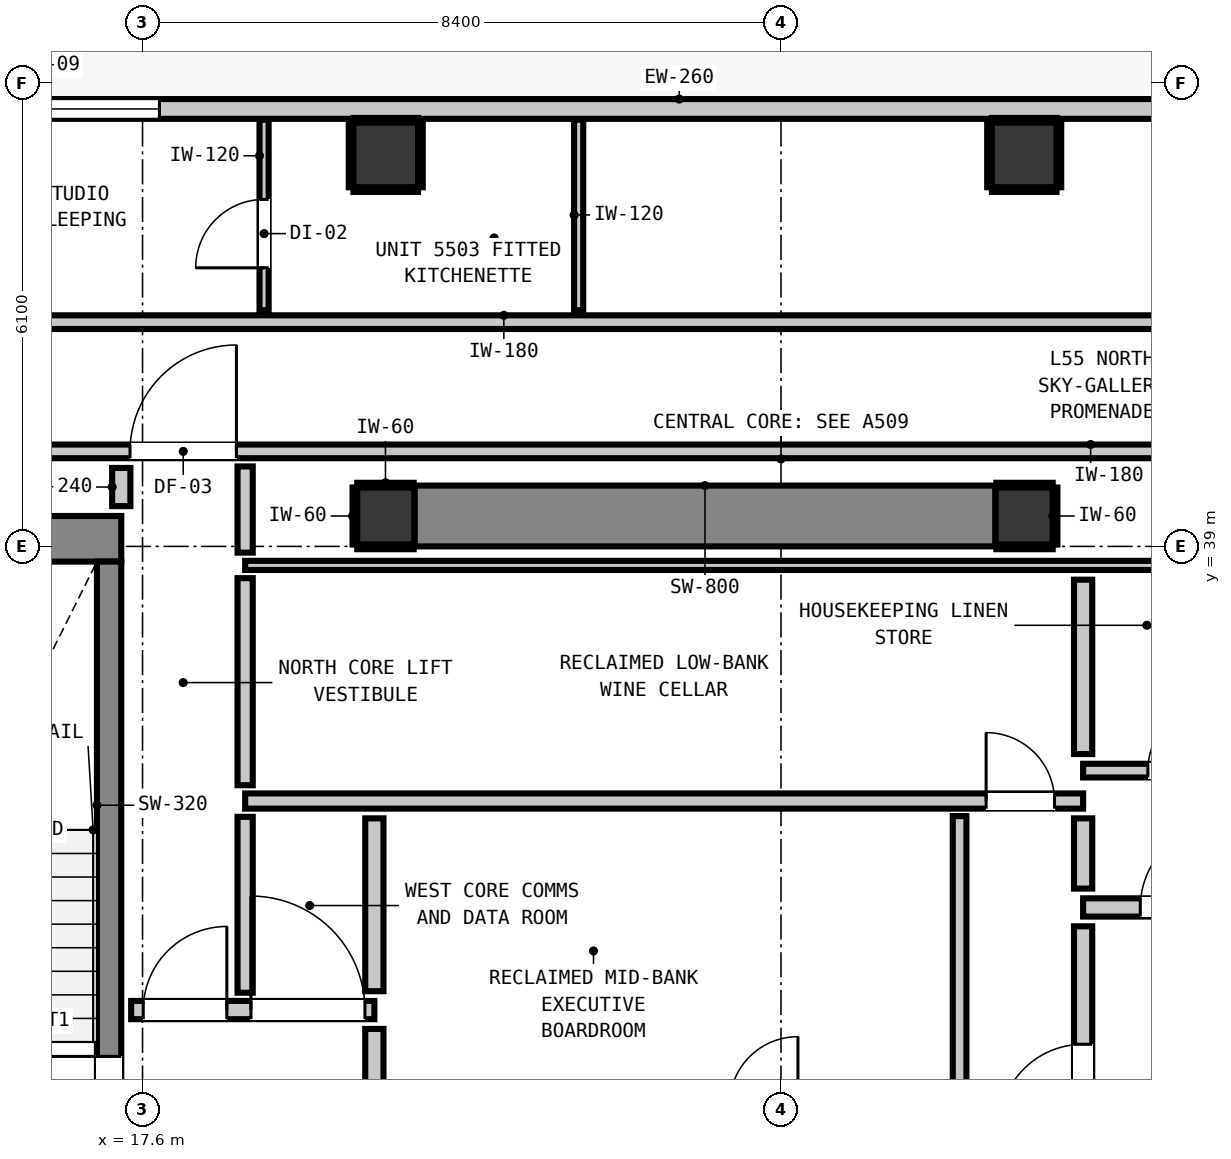
"""IFC4 building model, lengths in metres.
Left out: names, types, materials, properties, quantities, classifications, styles, units other than length and angle.
Written with IfcOpenShell. Run it as: python <this file> out.ifc"""

import sys

from ifc_helpers import new_model, si_unit, direction, frame, frame_2d, origin, origin_2d, place, context, subcontext, project, spatial, rectangle, extrude, element, fill, save


model = new_model("IFC4")
c1 = context("Model", 3, precision=1e-05, world=origin(), true_north=direction((0.0, 1.0)))
c2 = subcontext(c1, "Body", "Model", "MODEL_VIEW")
j1 = project(units=[si_unit("LENGTHUNIT", "METRE"), si_unit("PLANEANGLEUNIT", "RADIAN")], contexts=[c1])
p1 = place(None, origin())
s1 = spatial("IfcSite", under=j1, at=p1, CompositionType="ELEMENT")
p2 = place(p1, origin())
s2 = spatial("IfcBuilding", under=s1, at=p2, CompositionType="ELEMENT")
p3 = place(p2, frame((0.0, 0.0, 190.16)))
s3 = spatial("IfcBuildingStorey", under=s2, at=p3, CompositionType="ELEMENT", Elevation=190.16)
for number, where, z_axis, x_axis in (
    (1, (20.8, 39.4, 0.0), (0.0, 0.0, 1.0), (1.0, 0.0, 0.0)),
    (2, (29.2, 39.4, 0.0), (0.0, 0.0, 1.0), (1.0, 0.0, 0.0)),
):
    element("IfcColumn", number, at=place(p3, frame(where, z_axis=z_axis, x_axis=x_axis)), inside=s3, PredefinedType="COLUMN", context=c2, shape_type="SweptSolid", body=[
        extrude(rectangle(XDim=0.75, YDim=0.75, at=origin_2d()), origin(), (0.0, 0.0, 1.0), 3.32),
    ])
p4 = place(p3, frame((13.24, 39.1, 0.0), z_axis=(0.0, 0.0, 1.0), x_axis=(1.0, 0.0, 0.0)))
e3 = element("IfcWall", 3, at=p4, inside=s3, PredefinedType="SHEAR", context=c2, shape_type="SweptSolid", body=[
    extrude(rectangle(XDim=4.08, YDim=0.6, at=frame_2d((2.04, 0.0))), origin(), (0.0, 0.0, 1.0), 3.32),
])
p5 = place(p3, frame((21.18, 39.4, 0.0), z_axis=(0.0, 0.0, 1.0), x_axis=(1.0, 0.0, 0.0)))
e4 = element("IfcWall", 4, at=p5, inside=s3, PredefinedType="SHEAR", context=c2, shape_type="SweptSolid", body=[
    extrude(rectangle(XDim=7.64, YDim=0.8, at=frame_2d((3.82, 0.0))), origin(), (0.0, 0.0, 1.0), 3.32),
])
p6 = place(p3, frame((17.16, 31.0, 0.0), z_axis=(0.0, 0.0, 1.0), x_axis=(0.0, 1.0, 0.0)))
e5 = element("IfcWall", 5, at=p6, inside=s3, PredefinedType="SHEAR", context=c2, shape_type="SweptSolid", body=[
    extrude(rectangle(XDim=7.8, YDim=0.32, at=frame_2d((3.9, 0.0))), origin(), (0.0, 0.0, 1.0), 3.32),
])
p7 = place(p6, frame((0.19, 0.0, 0.0)))
e6 = element("IfcOpeningElement", 6, at=p7, cuts=e5, PredefinedType="OPENING", context=c2, shape_type="SweptSolid", body=[
    extrude(rectangle(XDim=1.1, YDim=2.15, at=frame_2d((0.55, 1.075))), frame((0.0, 0.17, 0.0), z_axis=(0.0, -1.0, 0.0), x_axis=(1.0, 0.0, 0.0)), (0.0, 0.0, 1.0), 0.34),
])
for number, where, z_axis, x_axis in (
    (7, (20.8, 44.15, -0.2), (0.0, 0.0, 1.0), (1.0, 0.0, 0.0)),
    (8, (29.2, 44.15, -0.2), (0.0, 0.0, 1.0), (1.0, 0.0, 0.0)),
):
    element("IfcColumn", number, at=place(p3, frame(where, z_axis=z_axis, x_axis=x_axis)), inside=s3, PredefinedType="COLUMN", context=c2, shape_type="SweptSolid", body=[
        extrude(rectangle(XDim=0.85, YDim=0.85, at=origin_2d()), origin(), (0.0, 0.0, 1.0), 3.52),
    ])
p8 = place(p3, frame((6.545, 44.755, 0.0), z_axis=(0.0, 0.0, 1.0), x_axis=(1.0, 0.0, 0.0)))
e9 = element("IfcWall", 9, at=p8, inside=s3, PredefinedType="STANDARD", context=c2, shape_type="SweptSolid", body=[
    extrude(rectangle(XDim=32.71, YDim=0.26, at=frame_2d((16.355, 0.0))), origin(), (0.0, 0.0, 1.0), 3.1),
])
p9 = place(p8, frame((0.857, 0.0, 0.0)))
e10 = element("IfcOpeningElement", 10, at=p9, cuts=e9, PredefinedType="OPENING", context=c2, shape_type="SweptSolid", body=[
    extrude(rectangle(XDim=1.1, YDim=2.15, at=frame_2d((0.55, 1.075))), frame((0.0, 0.14, 0.0), z_axis=(0.0, -1.0, 0.0), x_axis=(1.0, 0.0, 0.0)), (0.0, 0.0, 1.0), 0.28),
])
p10 = place(p8, frame((8.577, 0.0, 0.85)))
e11 = element("IfcOpeningElement", 11, at=p10, cuts=e9, PredefinedType="OPENING", context=c2, shape_type="SweptSolid", body=[
    extrude(rectangle(XDim=2.7, YDim=2.0, at=frame_2d((1.35, 1.0))), frame((0.0, 0.14, 0.0), z_axis=(0.0, -1.0, 0.0), x_axis=(1.0, 0.0, 0.0)), (0.0, 0.0, 1.0), 0.28),
])
p11 = place(p8, frame((24.955, 0.0, 0.85)))
e12 = element("IfcOpeningElement", 12, at=p11, cuts=e9, PredefinedType="OPENING", context=c2, shape_type="SweptSolid", body=[
    extrude(rectangle(XDim=2.7, YDim=2.0, at=frame_2d((1.35, 1.0))), frame((0.0, 0.14, 0.0), z_axis=(0.0, -1.0, 0.0), x_axis=(1.0, 0.0, 0.0)), (0.0, 0.0, 1.0), 0.28),
])
p12 = place(p3, frame((17.45, 32.9, 0.0), z_axis=(0.0, 0.0, 1.0), x_axis=(1.0, 0.0, 0.0)))
e13 = element("IfcWall", 13, at=p12, inside=s3, PredefinedType="PARTITIONING", context=c2, shape_type="SweptSolid", body=[
    extrude(rectangle(XDim=3.2, YDim=0.24, at=frame_2d((1.6, 0.0))), origin(), (0.0, 0.0, 1.0), 3.1),
])
p13 = place(p12, frame((0.159, 0.0, 0.0)))
e14 = element("IfcOpeningElement", 14, at=p13, cuts=e13, PredefinedType="OPENING", context=c2, shape_type="SweptSolid", body=[
    extrude(rectangle(XDim=1.1, YDim=2.15, at=frame_2d((0.55, 1.075))), frame((0.0, 0.13, 0.0), z_axis=(0.0, -1.0, 0.0), x_axis=(1.0, 0.0, 0.0)), (0.0, 0.0, 1.0), 0.26),
])
p14 = place(p12, frame((1.576, 0.0, 0.0)))
e15 = element("IfcOpeningElement", 15, at=p14, cuts=e13, PredefinedType="OPENING", context=c2, shape_type="SweptSolid", body=[
    extrude(rectangle(XDim=1.5, YDim=2.15, at=frame_2d((0.75, 1.075))), frame((0.0, 0.13, 0.0), z_axis=(0.0, -1.0, 0.0), x_axis=(1.0, 0.0, 0.0)), (0.0, 0.0, 1.0), 0.26),
])
p15 = place(p3, frame((29.975, 34.25, 0.0), z_axis=(0.0, 0.0, 1.0), x_axis=(1.0, 0.0, 0.0)))
e16 = element("IfcWall", 16, at=p15, inside=s3, PredefinedType="PARTITIONING", context=c2, shape_type="SweptSolid", body=[
    extrude(rectangle(XDim=2.475, YDim=0.24, at=frame_2d((1.237, 0.0))), origin(), (0.0, 0.0, 1.0), 3.1),
])
p16 = place(p15, frame((0.752, 0.0, 0.0)))
e17 = element("IfcOpeningElement", 17, at=p16, cuts=e16, PredefinedType="OPENING", context=c2, shape_type="SweptSolid", body=[
    extrude(rectangle(XDim=1.1, YDim=2.15, at=frame_2d((0.55, 1.075))), frame((0.0, 0.13, 0.0), z_axis=(0.0, -1.0, 0.0), x_axis=(1.0, 0.0, 0.0)), (0.0, 0.0, 1.0), 0.26),
])
p17 = place(p3, frame((18.95, 35.65, 0.0), z_axis=(0.0, 0.0, 1.0), x_axis=(1.0, 0.0, 0.0)))
e18 = element("IfcWall", 18, at=p17, inside=s3, PredefinedType="PARTITIONING", context=c2, shape_type="SweptSolid", body=[
    extrude(rectangle(XDim=11.025, YDim=0.2, at=frame_2d((5.513, 0.0))), origin(), (0.0, 0.0, 1.0), 3.1),
])
p18 = place(p17, frame((9.749, 0.0, 0.0)))
e19 = element("IfcOpeningElement", 19, at=p18, cuts=e18, PredefinedType="OPENING", context=c2, shape_type="SweptSolid", body=[
    extrude(rectangle(XDim=0.9, YDim=2.1, at=frame_2d((0.45, 1.05))), frame((0.0, 0.11, 0.0), z_axis=(0.0, -1.0, 0.0), x_axis=(1.0, 0.0, 0.0)), (0.0, 0.0, 1.0), 0.22),
])
p19 = place(p3, frame((29.975, 36.05, 0.0), z_axis=(0.0, 0.0, 1.0), x_axis=(1.0, 0.0, 0.0)))
e20 = element("IfcWall", 20, at=p19, inside=s3, PredefinedType="PARTITIONING", context=c2, shape_type="SweptSolid", body=[
    extrude(rectangle(XDim=2.505, YDim=0.18, at=frame_2d((1.252, 0.0))), origin(), (0.0, 0.0, 1.0), 3.1),
])
p20 = place(p19, frame((0.852, 0.0, 0.0)))
e21 = element("IfcOpeningElement", 21, at=p20, cuts=e20, PredefinedType="OPENING", context=c2, shape_type="SweptSolid", body=[
    extrude(rectangle(XDim=0.9, YDim=2.1, at=frame_2d((0.45, 1.05))), frame((0.0, 0.1, 0.0), z_axis=(0.0, -1.0, 0.0), x_axis=(1.0, 0.0, 0.0)), (0.0, 0.0, 1.0), 0.2),
])
p21 = place(p3, frame((13.012, 40.25, 0.0), z_axis=(0.0, 0.0, 1.0), x_axis=(1.0, 0.0, 0.0)))
e22 = element("IfcWall", 22, at=p21, inside=s3, PredefinedType="PARTITIONING", context=c2, shape_type="SweptSolid", body=[
    extrude(rectangle(XDim=28.201, YDim=0.18, at=frame_2d((14.101, 0.0))), origin(), (0.0, 0.0, 1.0), 3.1),
])
p22 = place(p21, frame((4.423, 0.0, 0.0)))
e23 = element("IfcOpeningElement", 23, at=p22, cuts=e22, PredefinedType="OPENING", context=c2, shape_type="SweptSolid", body=[
    extrude(rectangle(XDim=1.4, YDim=2.15, at=frame_2d((0.7, 1.075))), frame((0.0, 0.1, 0.0), z_axis=(0.0, -1.0, 0.0), x_axis=(1.0, 0.0, 0.0)), (0.0, 0.0, 1.0), 0.2),
])
p23 = place(p3, frame((13.012, 41.95, 0.0), z_axis=(0.0, 0.0, 1.0), x_axis=(1.0, 0.0, 0.0)))
e24 = element("IfcWall", 24, at=p23, inside=s3, PredefinedType="PARTITIONING", context=c2, shape_type="SweptSolid", body=[
    extrude(rectangle(XDim=28.201, YDim=0.18, at=frame_2d((14.101, 0.0))), origin(), (0.0, 0.0, 1.0), 3.1),
])
p24 = place(p23, frame((18.783, 0.0, 0.0)))
e25 = element("IfcOpeningElement", 25, at=p24, cuts=e24, PredefinedType="OPENING", context=c2, shape_type="SweptSolid", body=[
    extrude(rectangle(XDim=0.9, YDim=2.1, at=frame_2d((0.45, 1.05))), frame((0.0, 0.1, 0.0), z_axis=(0.0, -1.0, 0.0), x_axis=(1.0, 0.0, 0.0)), (0.0, 0.0, 1.0), 0.2),
])
p25 = place(p3, frame((18.95, 38.75, 0.0), z_axis=(0.0, 0.0, 1.0), x_axis=(1.0, 0.0, 0.0)))
e26 = element("IfcWall", 26, at=p25, inside=s3, PredefinedType="PARTITIONING", context=c2, shape_type="SweptSolid", body=[
    extrude(rectangle(XDim=13.56, YDim=0.12, at=frame_2d((6.78, 0.0))), origin(), (0.0, 0.0, 1.0), 3.1),
])
p26 = place(p3, frame((17.32, 39.53, 0.0), z_axis=(0.0, 0.0, 1.0), x_axis=(0.0, 1.0, 0.0)))
e27 = element("IfcWall", 27, at=p26, inside=s3, PredefinedType="PARTITIONING", context=c2, shape_type="SweptSolid", body=[
    extrude(rectangle(XDim=0.502, YDim=0.24, at=frame_2d((0.251, 0.0))), origin(), (0.0, 0.0, 1.0), 3.1),
])
p27 = place(p3, frame((20.65, 31.868, 0.0), z_axis=(0.0, 0.0, 1.0), x_axis=(0.0, 1.0, 0.0)))
e28 = element("IfcWall", 28, at=p27, inside=s3, PredefinedType="PARTITIONING", context=c2, shape_type="SweptSolid", body=[
    extrude(rectangle(XDim=0.784, YDim=0.24, at=frame_2d((0.392, 0.0))), origin(), (0.0, 0.0, 1.0), 2.335),
])
p28 = place(p3, frame((20.65, 33.148, 0.0), z_axis=(0.0, 0.0, 1.0), x_axis=(0.0, 1.0, 0.0)))
e29 = element("IfcWall", 29, at=p28, inside=s3, PredefinedType="PARTITIONING", context=c2, shape_type="SweptSolid", body=[
    extrude(rectangle(XDim=2.274, YDim=0.24, at=frame_2d((1.137, 0.0))), origin(), (0.0, 0.0, 1.0), 2.335),
])
p29 = place(p3, frame((29.975, 29.768, 0.0), z_axis=(0.0, 0.0, 1.0), x_axis=(0.0, 1.0, 0.0)))
e30 = element("IfcWall", 30, at=p29, inside=s3, PredefinedType="PARTITIONING", context=c2, shape_type="SweptSolid", body=[
    extrude(rectangle(XDim=4.234, YDim=0.24, at=frame_2d((2.117, 0.0))), origin(), (0.0, 0.0, 1.0), 3.1),
])
p30 = place(p29, frame((1.582, 0.0, 0.0)))
e31 = element("IfcOpeningElement", 31, at=p30, cuts=e30, PredefinedType="OPENING", context=c2, shape_type="SweptSolid", body=[
    extrude(rectangle(XDim=1.1, YDim=2.15, at=frame_2d((0.55, 1.075))), frame((0.0, 0.13, 0.0), z_axis=(0.0, -1.0, 0.0), x_axis=(1.0, 0.0, 0.0)), (0.0, 0.0, 1.0), 0.26),
])
p31 = place(p3, frame((29.975, 34.498, 0.0), z_axis=(0.0, 0.0, 1.0), x_axis=(0.0, 1.0, 0.0)))
e32 = element("IfcWall", 32, at=p31, inside=s3, PredefinedType="PARTITIONING", context=c2, shape_type="SweptSolid", body=[
    extrude(rectangle(XDim=0.924, YDim=0.24, at=frame_2d((0.462, 0.0))), origin(), (0.0, 0.0, 1.0), 3.1),
])
p32 = place(p3, frame((29.975, 36.268, 0.0), z_axis=(0.0, 0.0, 1.0), x_axis=(0.0, 1.0, 0.0)))
e33 = element("IfcWall", 33, at=p32, inside=s3, PredefinedType="PARTITIONING", context=c2, shape_type="SweptSolid", body=[
    extrude(rectangle(XDim=2.294, YDim=0.24, at=frame_2d((1.147, 0.0))), origin(), (0.0, 0.0, 1.0), 3.1),
])
p33 = place(p3, frame((18.95, 33.128, 0.0), z_axis=(0.0, 0.0, 1.0), x_axis=(0.0, 1.0, 0.0)))
e34 = element("IfcWall", 34, at=p33, inside=s3, PredefinedType="PARTITIONING", context=c2, shape_type="SweptSolid", body=[
    extrude(rectangle(XDim=2.314, YDim=0.2, at=frame_2d((1.157, 0.0))), origin(), (0.0, 0.0, 1.0), 3.1),
])
p34 = place(p3, frame((18.95, 35.858, 0.0), z_axis=(0.0, 0.0, 1.0), x_axis=(0.0, 1.0, 0.0)))
e35 = element("IfcWall", 35, at=p34, inside=s3, PredefinedType="PARTITIONING", context=c2, shape_type="SweptSolid", body=[
    extrude(rectangle(XDim=2.724, YDim=0.2, at=frame_2d((1.362, 0.0))), origin(), (0.0, 0.0, 1.0), 3.1),
])
p35 = place(p3, frame((18.95, 38.918, 0.0), z_axis=(0.0, 0.0, 1.0), x_axis=(0.0, 1.0, 0.0)))
e36 = element("IfcWall", 36, at=p35, inside=s3, PredefinedType="PARTITIONING", context=c2, shape_type="SweptSolid", body=[
    extrude(rectangle(XDim=1.134, YDim=0.2, at=frame_2d((0.567, 0.0))), origin(), (0.0, 0.0, 1.0), 3.1),
])
p36 = place(p3, frame((28.35, 31.838, 0.0), z_axis=(0.0, 0.0, 1.0), x_axis=(0.0, 1.0, 0.0)))
e37 = element("IfcWall", 37, at=p36, inside=s3, PredefinedType="PARTITIONING", context=c2, shape_type="SweptSolid", body=[
    extrude(rectangle(XDim=3.614, YDim=0.18, at=frame_2d((1.807, 0.0))), origin(), (0.0, 0.0, 1.0), 3.1),
])
p37 = place(p3, frame((19.199, 42.108, 0.0), z_axis=(0.0, 0.0, 1.0), x_axis=(0.0, 1.0, 0.0)))
e38 = element("IfcWall", 38, at=p37, inside=s3, PredefinedType="PARTITIONING", context=c2, shape_type="SweptSolid", body=[
    extrude(rectangle(XDim=2.505, YDim=0.12, at=frame_2d((1.252, 0.0))), origin(), (0.0, 0.0, 1.0), 3.1),
])
p38 = place(p37, frame((0.557, 0.0, 0.0)))
e39 = element("IfcOpeningElement", 39, at=p38, cuts=e38, PredefinedType="OPENING", context=c2, shape_type="SweptSolid", body=[
    extrude(rectangle(XDim=0.9, YDim=2.1, at=frame_2d((0.45, 1.05))), frame((0.0, 0.07, 0.0), z_axis=(0.0, -1.0, 0.0), x_axis=(1.0, 0.0, 0.0)), (0.0, 0.0, 1.0), 0.14),
])
p39 = place(p3, frame((23.338, 42.108, 0.0), z_axis=(0.0, 0.0, 1.0), x_axis=(0.0, 1.0, 0.0)))
e40 = element("IfcWall", 40, at=p39, inside=s3, PredefinedType="PARTITIONING", context=c2, shape_type="SweptSolid", body=[
    extrude(rectangle(XDim=2.505, YDim=0.12, at=frame_2d((1.252, 0.0))), origin(), (0.0, 0.0, 1.0), 3.1),
])
for number, where, z_axis, x_axis in (
    (41, (20.425, 38.993, 0.0), (0.0, 0.0, 1.0), (1.0, 0.0, 0.0)),
    (42, (20.425, 39.807, 0.0), (0.0, 0.0, 1.0), (1.0, 0.0, 0.0)),
):
    element("IfcWall", number, at=place(p3, frame(where, z_axis=z_axis, x_axis=x_axis)), inside=s3, PredefinedType="PARTITIONING", context=c2, shape_type="SweptSolid", body=[
        extrude(rectangle(XDim=0.742, YDim=0.06, at=frame_2d((0.371, 0.0))), origin(), (0.0, 0.0, 1.0), 1.45),
    ])
p40 = place(p3, frame((20.393, 39.025, 0.0), z_axis=(0.0, 0.0, 1.0), x_axis=(0.0, 1.0, 0.0)))
e43 = element("IfcWall", 43, at=p40, inside=s3, PredefinedType="PARTITIONING", context=c2, shape_type="SweptSolid", body=[
    extrude(rectangle(XDim=0.75, YDim=0.06, at=frame_2d((0.375, 0.0))), origin(), (0.0, 0.0, 1.0), 1.45),
])
for number, where, z_axis, x_axis in (
    (44, (28.833, 38.993, 0.0), (0.0, 0.0, 1.0), (1.0, 0.0, 0.0)),
    (45, (28.833, 39.807, 0.0), (0.0, 0.0, 1.0), (1.0, 0.0, 0.0)),
):
    element("IfcWall", number, at=place(p3, frame(where, z_axis=z_axis, x_axis=x_axis)), inside=s3, PredefinedType="PARTITIONING", context=c2, shape_type="SweptSolid", body=[
        extrude(rectangle(XDim=0.742, YDim=0.06, at=frame_2d((0.371, 0.0))), origin(), (0.0, 0.0, 1.0), 1.45),
    ])
p41 = place(p3, frame((29.607, 39.025, 0.0), z_axis=(0.0, 0.0, 1.0), x_axis=(0.0, 1.0, 0.0)))
e46 = element("IfcWall", 46, at=p41, inside=s3, PredefinedType="PARTITIONING", context=c2, shape_type="SweptSolid", body=[
    extrude(rectangle(XDim=0.75, YDim=0.06, at=frame_2d((0.375, 0.0))), origin(), (0.0, 0.0, 1.0), 1.45),
])
for number, where, z_axis, x_axis in (
    (47, (20.375, 43.693, 0.0), (0.0, 0.0, 1.0), (1.0, 0.0, 0.0)),
    (48, (20.375, 44.607, 0.0), (0.0, 0.0, 1.0), (1.0, 0.0, 0.0)),
):
    element("IfcWall", number, at=place(p3, frame(where, z_axis=z_axis, x_axis=x_axis)), inside=s3, PredefinedType="PARTITIONING", context=c2, shape_type="SweptSolid", body=[
        extrude(rectangle(XDim=0.85, YDim=0.06, at=frame_2d((0.425, 0.0))), origin(), (0.0, 0.0, 1.0), 1.45),
    ])
for number, where, z_axis, x_axis in (
    (49, (20.343, 43.725, 0.0), (0.0, 0.0, 1.0), (0.0, 1.0, 0.0)),
    (50, (21.257, 43.725, 0.0), (0.0, 0.0, 1.0), (0.0, 1.0, 0.0)),
):
    element("IfcWall", number, at=place(p3, frame(where, z_axis=z_axis, x_axis=x_axis)), inside=s3, PredefinedType="PARTITIONING", context=c2, shape_type="SweptSolid", body=[
        extrude(rectangle(XDim=0.85, YDim=0.06, at=frame_2d((0.425, 0.0))), origin(), (0.0, 0.0, 1.0), 1.45),
    ])
for number, where, z_axis, x_axis in (
    (51, (28.775, 43.693, 0.0), (0.0, 0.0, 1.0), (1.0, 0.0, 0.0)),
    (52, (28.775, 44.607, 0.0), (0.0, 0.0, 1.0), (1.0, 0.0, 0.0)),
):
    element("IfcWall", number, at=place(p3, frame(where, z_axis=z_axis, x_axis=x_axis)), inside=s3, PredefinedType="PARTITIONING", context=c2, shape_type="SweptSolid", body=[
        extrude(rectangle(XDim=0.85, YDim=0.06, at=frame_2d((0.425, 0.0))), origin(), (0.0, 0.0, 1.0), 1.45),
    ])
for number, where, z_axis, x_axis in (
    (53, (28.743, 43.725, 0.0), (0.0, 0.0, 1.0), (0.0, 1.0, 0.0)),
    (54, (29.657, 43.725, 0.0), (0.0, 0.0, 1.0), (0.0, 1.0, 0.0)),
):
    element("IfcWall", number, at=place(p3, frame(where, z_axis=z_axis, x_axis=x_axis)), inside=s3, PredefinedType="PARTITIONING", context=c2, shape_type="SweptSolid", body=[
        extrude(rectangle(XDim=0.85, YDim=0.06, at=frame_2d((0.425, 0.0))), origin(), (0.0, 0.0, 1.0), 1.45),
    ])
p42 = place(p10, origin())
e55 = element("IfcWindow", 55, at=p42, inside=s3, PartitioningType="SINGLE_PANEL", PredefinedType="WINDOW", context=c2, shape_type="SweptSolid", body=[
    extrude(rectangle(XDim=2.7, YDim=2.0, at=frame_2d((1.35, 1.0))), frame((0.0, 0.03, 0.0), z_axis=(0.0, -1.0, 0.0), x_axis=(1.0, 0.0, 0.0)), (0.0, 0.0, 1.0), 0.06),
])
fill(e11, e55)
p43 = place(p7, origin())
e56 = element("IfcDoor", 56, at=p43, inside=s3, OperationType="SINGLE_SWING_RIGHT", PredefinedType="DOOR", context=c2, shape_type="SweptSolid", body=[
    extrude(rectangle(XDim=1.1, YDim=2.15, at=frame_2d((0.55, 1.075))), frame((0.0, 0.025, 0.0), z_axis=(0.0, -1.0, 0.0), x_axis=(1.0, 0.0, 0.0)), (0.0, 0.0, 1.0), 0.05),
])
fill(e6, e56)
p44 = place(p13, origin())
e57 = element("IfcDoor", 57, at=p44, inside=s3, OperationType="SINGLE_SWING_RIGHT", PredefinedType="DOOR", context=c2, shape_type="SweptSolid", body=[
    extrude(rectangle(XDim=1.1, YDim=2.15, at=frame_2d((0.55, 1.075))), frame((0.0, 0.025, 0.0), z_axis=(0.0, -1.0, 0.0), x_axis=(1.0, 0.0, 0.0)), (0.0, 0.0, 1.0), 0.05),
])
fill(e14, e57)
p45 = place(p30, origin())
e58 = element("IfcDoor", 58, at=p45, inside=s3, OperationType="SINGLE_SWING_LEFT", PredefinedType="DOOR", context=c2, shape_type="SweptSolid", body=[
    extrude(rectangle(XDim=1.1, YDim=2.15, at=frame_2d((0.55, 1.075))), frame((0.0, 0.025, 0.0), z_axis=(0.0, -1.0, 0.0), x_axis=(1.0, 0.0, 0.0)), (0.0, 0.0, 1.0), 0.05),
])
fill(e31, e58)
p46 = place(p16, origin())
e59 = element("IfcDoor", 59, at=p46, inside=s3, OperationType="SINGLE_SWING_RIGHT", PredefinedType="DOOR", context=c2, shape_type="SweptSolid", body=[
    extrude(rectangle(XDim=1.1, YDim=2.15, at=frame_2d((0.55, 1.075))), frame((0.0, 0.025, 0.0), z_axis=(0.0, -1.0, 0.0), x_axis=(1.0, 0.0, 0.0)), (0.0, 0.0, 1.0), 0.05),
])
fill(e17, e59)
p47 = place(p22, origin())
e60 = element("IfcDoor", 60, at=p47, inside=s3, OperationType="SINGLE_SWING_RIGHT", PredefinedType="DOOR", context=c2, shape_type="SweptSolid", body=[
    extrude(rectangle(XDim=1.4, YDim=2.15, at=frame_2d((0.7, 1.075))), frame((0.0, 0.025, 0.0), z_axis=(0.0, -1.0, 0.0), x_axis=(1.0, 0.0, 0.0)), (0.0, 0.0, 1.0), 0.05),
])
fill(e23, e60)
p48 = place(p14, origin())
e61 = element("IfcDoor", 61, at=p48, inside=s3, OperationType="SINGLE_SWING_LEFT", PredefinedType="DOOR", context=c2, shape_type="SweptSolid", body=[
    extrude(rectangle(XDim=1.5, YDim=2.15, at=frame_2d((0.75, 1.075))), frame((0.0, 0.025, 0.0), z_axis=(0.0, -1.0, 0.0), x_axis=(1.0, 0.0, 0.0)), (0.0, 0.0, 1.0), 0.05),
])
fill(e15, e61)
p49 = place(p20, origin())
e62 = element("IfcDoor", 62, at=p49, inside=s3, OperationType="SINGLE_SWING_RIGHT", PredefinedType="DOOR", context=c2, shape_type="SweptSolid", body=[
    extrude(rectangle(XDim=0.9, YDim=2.1, at=frame_2d((0.45, 1.05))), frame((0.0, 0.025, 0.0), z_axis=(0.0, -1.0, 0.0), x_axis=(1.0, 0.0, 0.0)), (0.0, 0.0, 1.0), 0.05),
])
fill(e21, e62)
p50 = place(p18, origin())
e63 = element("IfcDoor", 63, at=p50, inside=s3, OperationType="SINGLE_SWING_LEFT", PredefinedType="DOOR", context=c2, shape_type="SweptSolid", body=[
    extrude(rectangle(XDim=0.9, YDim=2.1, at=frame_2d((0.45, 1.05))), frame((0.0, 0.025, 0.0), z_axis=(0.0, -1.0, 0.0), x_axis=(1.0, 0.0, 0.0)), (0.0, 0.0, 1.0), 0.05),
])
fill(e19, e63)
p51 = place(p38, origin())
e64 = element("IfcDoor", 64, at=p51, inside=s3, OperationType="SINGLE_SWING_LEFT", PredefinedType="DOOR", context=c2, shape_type="SweptSolid", body=[
    extrude(rectangle(XDim=0.9, YDim=2.1, at=frame_2d((0.45, 1.05))), frame((0.0, 0.025, 0.0), z_axis=(0.0, -1.0, 0.0), x_axis=(1.0, 0.0, 0.0)), (0.0, 0.0, 1.0), 0.05),
])
fill(e39, e64)
save(model, sys.argv[1])
